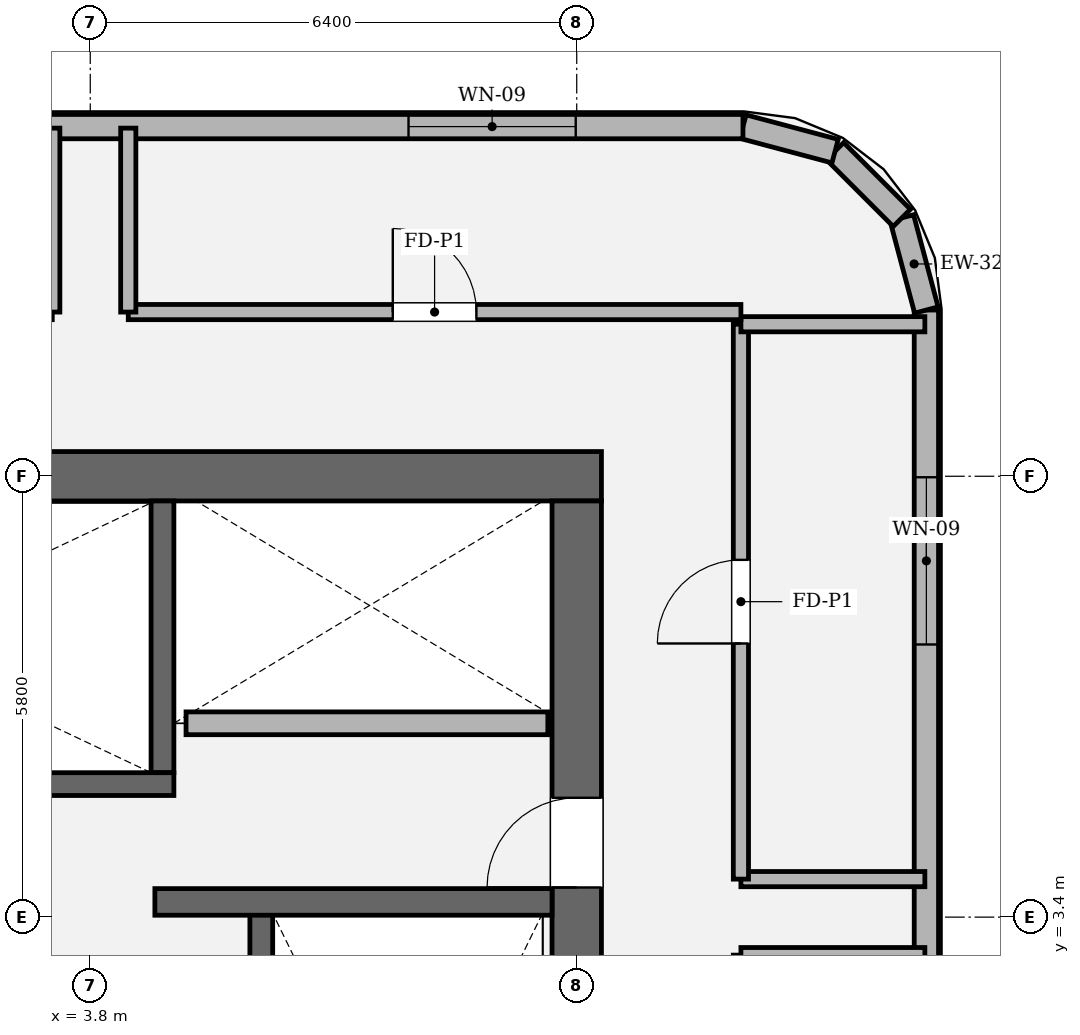
"""IFC4 building model, lengths in metres.
Left out: names, types, materials, properties, quantities, classifications, styles, units other than length and angle.
Written with IfcOpenShell. Run it as: python <this file> out.ifc"""

import sys

from ifc_helpers import new_model, si_unit, direction, frame, frame_2d, origin, place, context, subcontext, project, spatial, rectangle, extrude, element, fill, save


model = new_model("IFC4")
c1 = context("Model", 3, precision=1e-05, world=origin(), true_north=direction((0.0, 1.0)))
c2 = subcontext(c1, "Body", "Model", "MODEL_VIEW")
j1 = project(units=[si_unit("LENGTHUNIT", "METRE"), si_unit("PLANEANGLEUNIT", "RADIAN")], contexts=[c1])
p1 = place(None, origin())
s1 = spatial("IfcSite", under=j1, at=p1, CompositionType="ELEMENT")
p2 = place(p1, origin())
s2 = spatial("IfcBuilding", under=s1, at=p2, CompositionType="ELEMENT")
p3 = place(p2, frame((0.0, 0.0, 130.2)))
s3 = spatial("IfcBuildingStorey", under=s2, at=p3, CompositionType="ELEMENT", Elevation=130.2)
p4 = place(p3, frame((-10.525, 9.2, 0.0), z_axis=(0.0, 0.0, 1.0), x_axis=(1.0, 0.0, 0.0)))
e1 = element("IfcWall", 1, at=p4, inside=s3, PredefinedType="SHEAR", context=c2, shape_type="SweptSolid", body=[
    extrude(rectangle(XDim=21.05, YDim=0.65, at=frame_2d((10.525, 0.0))), origin(), (0.0, 0.0, 1.0), 4.8),
])
p5 = place(p3, frame((10.2, 8.875, 0.0), z_axis=(0.0, 0.0, 1.0), x_axis=(0.0, -1.0, 0.0)))
e2 = element("IfcWall", 2, at=p5, inside=s3, PredefinedType="SHEAR", context=c2, shape_type="SweptSolid", body=[
    extrude(rectangle(XDim=17.75, YDim=0.65, at=frame_2d((8.875, 0.0))), origin(), (0.0, 0.0, 1.0), 4.8),
])
p6 = place(p5, frame((3.905, 0.0, 0.0)))
e3 = element("IfcOpeningElement", 3, at=p6, cuts=e2, PredefinedType="OPENING", context=c2, shape_type="SweptSolid", body=[
    extrude(rectangle(XDim=1.18, YDim=2.2, at=frame_2d((0.59, 1.1))), frame((0.0, 0.335, 0.0), z_axis=(0.0, -1.0, 0.0), x_axis=(1.0, 0.0, 0.0)), (0.0, 0.0, 1.0), 0.67),
])
p7 = place(p3, frame((6.05, 3.45, 0.0), z_axis=(0.0, 0.0, 1.0), x_axis=(0.0, -1.0, 0.0)))
e4 = element("IfcWall", 4, at=p7, inside=s3, PredefinedType="SOLIDWALL", context=c2, shape_type="SweptSolid", body=[
    extrude(rectangle(XDim=8.95, YDim=0.3, at=frame_2d((4.475, 0.0))), origin(), (0.0, 0.0, 1.0), 4.8),
])
p8 = place(p3, frame((4.75, 8.875, 0.0), z_axis=(0.0, 0.0, 1.0), x_axis=(0.0, -1.0, 0.0)))
e5 = element("IfcWall", 5, at=p8, inside=s3, PredefinedType="SOLIDWALL", context=c2, shape_type="SweptSolid", body=[
    extrude(rectangle(XDim=3.575, YDim=0.3, at=frame_2d((1.788, 0.0))), origin(), (0.0, 0.0, 1.0), 4.8),
])
p9 = place(p3, frame((-4.9, 5.15, 0.0), z_axis=(0.0, 0.0, 1.0), x_axis=(1.0, 0.0, 0.0)))
e6 = element("IfcWall", 6, at=p9, inside=s3, PredefinedType="SOLIDWALL", context=c2, shape_type="SweptSolid", body=[
    extrude(rectangle(XDim=9.8, YDim=0.3, at=frame_2d((4.9, 0.0))), origin(), (0.0, 0.0, 1.0), 4.8),
])
p10 = place(p9, frame((0.56, 0.0, 0.0)))
e7 = element("IfcOpeningElement", 7, at=p10, cuts=e6, PredefinedType="OPENING", context=c2, shape_type="SweptSolid", body=[
    extrude(rectangle(XDim=1.18, YDim=2.2, at=frame_2d((0.59, 1.1))), frame((0.0, 0.16, 0.0), z_axis=(0.0, -1.0, 0.0), x_axis=(1.0, 0.0, 0.0)), (0.0, 0.0, 1.0), 0.32),
])
p11 = place(p3, frame((4.65, 3.6, 0.0), z_axis=(0.0, 0.0, 1.0), x_axis=(1.0, 0.0, 0.0)))
e8 = element("IfcWall", 8, at=p11, inside=s3, PredefinedType="SOLIDWALL", context=c2, shape_type="SweptSolid", body=[
    extrude(rectangle(XDim=5.225, YDim=0.35, at=frame_2d((2.613, 0.0))), origin(), (0.0, 0.0, 1.0), 4.8),
])
p12 = place(p3, frame((14.8, -11.387, 0.0), z_axis=(0.0, 0.0, 1.0), x_axis=(0.0, 1.0, 0.0)))
e9 = element("IfcWall", 9, at=p12, inside=s3, PredefinedType="SOLIDWALL", context=c2, shape_type="SweptSolid", body=[
    extrude(rectangle(XDim=22.774, YDim=0.32, at=frame_2d((11.387, 0.0))), origin(), (0.0, 0.0, 1.0), 3.834),
])
p13 = place(p12, frame((2.2, 0.0, 0.9)))
e10 = element("IfcOpeningElement", 10, at=p13, cuts=e9, PredefinedType="OPENING", context=c2, shape_type="SweptSolid", body=[
    extrude(rectangle(XDim=2.2, YDim=1.2, at=frame_2d((1.1, 0.6))), frame((0.0, 0.17, 0.0), z_axis=(0.0, -1.0, 0.0), x_axis=(1.0, 0.0, 0.0)), (0.0, 0.0, 1.0), 0.34),
])
p14 = place(p12, frame((18.374, 0.0, 0.9)))
e11 = element("IfcOpeningElement", 11, at=p14, cuts=e9, PredefinedType="OPENING", context=c2, shape_type="SweptSolid", body=[
    extrude(rectangle(XDim=2.2, YDim=1.2, at=frame_2d((1.1, 0.6))), frame((0.0, 0.17, 0.0), z_axis=(0.0, -1.0, 0.0), x_axis=(1.0, 0.0, 0.0)), (0.0, 0.0, 1.0), 0.34),
])
p15 = place(p3, frame((14.8, 11.387, 0.0), z_axis=(0.0, 0.0, 1.0), x_axis=(-0.25748094776, 0.966283375382, 0.0)))
e12 = element("IfcWall", 12, at=p15, inside=s3, PredefinedType="SOLIDWALL", context=c2, shape_type="SweptSolid", body=[
    extrude(rectangle(XDim=1.254, YDim=0.32, at=frame_2d((0.627, 0.0))), origin(), (0.0, 0.0, 1.0), 3.984),
])
p16 = place(p3, frame((14.477, 12.599, 0.0), z_axis=(0.0, 0.0, 1.0), x_axis=(-0.707106781187, 0.707106781187, 0.0)))
e13 = element("IfcWall", 13, at=p16, inside=s3, PredefinedType="SOLIDWALL", context=c2, shape_type="SweptSolid", body=[
    extrude(rectangle(XDim=1.242, YDim=0.32, at=frame_2d((0.621, 0.0))), origin(), (0.0, 0.0, 1.0), 3.984),
])
p17 = place(p3, frame((13.599, 13.477, 0.0), z_axis=(0.0, 0.0, 1.0), x_axis=(-0.966283375382, 0.25748094776, 0.0)))
e14 = element("IfcWall", 14, at=p17, inside=s3, PredefinedType="SOLIDWALL", context=c2, shape_type="SweptSolid", body=[
    extrude(rectangle(XDim=1.254, YDim=0.32, at=frame_2d((0.627, 0.0))), origin(), (0.0, 0.0, 1.0), 3.984),
])
p18 = place(p3, frame((12.387, 13.8, 0.0), z_axis=(0.0, 0.0, 1.0), x_axis=(-1.0, 0.0, 0.0)))
e15 = element("IfcWall", 15, at=p18, inside=s3, PredefinedType="SOLIDWALL", context=c2, shape_type="SweptSolid", body=[
    extrude(rectangle(XDim=24.774, YDim=0.32, at=frame_2d((12.387, 0.0))), origin(), (0.0, 0.0, 1.0), 3.834),
])
p19 = place(p18, frame((2.2, 0.0, 0.9)))
e16 = element("IfcOpeningElement", 16, at=p19, cuts=e15, PredefinedType="OPENING", context=c2, shape_type="SweptSolid", body=[
    extrude(rectangle(XDim=2.2, YDim=1.2, at=frame_2d((1.1, 0.6))), frame((0.0, 0.17, 0.0), z_axis=(0.0, -1.0, 0.0), x_axis=(1.0, 0.0, 0.0)), (0.0, 0.0, 1.0), 0.34),
])
p20 = place(p18, frame((20.374, 0.0, 0.9)))
e17 = element("IfcOpeningElement", 17, at=p20, cuts=e15, PredefinedType="OPENING", context=c2, shape_type="SweptSolid", body=[
    extrude(rectangle(XDim=2.2, YDim=1.2, at=frame_2d((1.1, 0.6))), frame((0.0, 0.17, 0.0), z_axis=(0.0, -1.0, 0.0), x_axis=(1.0, 0.0, 0.0)), (0.0, 0.0, 1.0), 0.34),
])
p21 = place(p3, frame((5.06, 5.95, 0.0), z_axis=(0.0, 0.0, 1.0), x_axis=(1.0, 0.0, 0.0)))
e18 = element("IfcWall", 18, at=p21, inside=s3, PredefinedType="SOLIDWALL", context=c2, shape_type="SweptSolid", body=[
    extrude(rectangle(XDim=4.76, YDim=0.3, at=frame_2d((2.38, 0.0))), origin(), (0.0, 0.0, 1.0), 4.54),
])
for number, where, z_axis, x_axis in (
    (19, (12.36, 2.9, 0.0), (0.0, 0.0, 1.0), (1.0, 0.0, 0.0)),
    (20, (14.78, 3.9, 0.0), (0.0, 0.0, 1.0), (-1.0, 0.0, 0.0)),
):
    element("IfcWall", number, at=place(p3, frame(where, z_axis=z_axis, x_axis=x_axis)), inside=s3, PredefinedType="SOLIDWALL", context=c2, shape_type="SweptSolid", body=[
        extrude(rectangle(XDim=2.42, YDim=0.2, at=frame_2d((1.21, 0.0))), origin(), (0.0, 0.0, 1.0), 3.984),
    ])
p22 = place(p3, frame((12.36, 3.9, 0.0), z_axis=(0.0, 0.0, 1.0), x_axis=(0.0, 1.0, 0.0)))
e21 = element("IfcWall", 21, at=p22, inside=s3, PredefinedType="SOLIDWALL", context=c2, shape_type="SweptSolid", body=[
    extrude(rectangle(XDim=7.3, YDim=0.2, at=frame_2d((3.65, 0.0))), origin(), (0.0, 0.0, 1.0), 4.54),
])
p23 = place(p22, frame((3.1, 0.0, 0.0)))
e22 = element("IfcOpeningElement", 22, at=p23, cuts=e21, PredefinedType="OPENING", context=c2, shape_type="SweptSolid", body=[
    extrude(rectangle(XDim=1.1, YDim=2.2, at=frame_2d((0.55, 1.1))), frame((0.0, 0.11, 0.0), z_axis=(0.0, -1.0, 0.0), x_axis=(1.0, 0.0, 0.0)), (0.0, 0.0, 1.0), 0.22),
])
for number, where, z_axis, x_axis in (
    (23, (12.36, 11.2, 0.0), (0.0, 0.0, 1.0), (1.0, 0.0, 0.0)),
    (24, (3.3, 13.78, 0.0), (0.0, 0.0, 1.0), (0.0, -1.0, 0.0)),
):
    element("IfcWall", number, at=place(p3, frame(where, z_axis=z_axis, x_axis=x_axis)), inside=s3, PredefinedType="SOLIDWALL", context=c2, shape_type="SweptSolid", body=[
        extrude(rectangle(XDim=2.42, YDim=0.2, at=frame_2d((1.21, 0.0))), origin(), (0.0, 0.0, 1.0), 3.984),
    ])
p24 = place(p3, frame((12.36, 11.36, 0.0), z_axis=(0.0, 0.0, 1.0), x_axis=(-1.0, 0.0, 0.0)))
e25 = element("IfcWall", 25, at=p24, inside=s3, PredefinedType="SOLIDWALL", context=c2, shape_type="SweptSolid", body=[
    extrude(rectangle(XDim=8.06, YDim=0.2, at=frame_2d((4.03, 0.0))), origin(), (0.0, 0.0, 1.0), 4.54),
])
p25 = place(p24, frame((3.48, 0.0, 0.0)))
e26 = element("IfcOpeningElement", 26, at=p25, cuts=e25, PredefinedType="OPENING", context=c2, shape_type="SweptSolid", body=[
    extrude(rectangle(XDim=1.1, YDim=2.2, at=frame_2d((0.55, 1.1))), frame((0.0, 0.11, 0.0), z_axis=(0.0, -1.0, 0.0), x_axis=(1.0, 0.0, 0.0)), (0.0, 0.0, 1.0), 0.22),
])
p26 = place(p3, frame((4.3, 11.36, 0.0), z_axis=(0.0, 0.0, 1.0), x_axis=(0.0, 1.0, 0.0)))
e27 = element("IfcWall", 27, at=p26, inside=s3, PredefinedType="SOLIDWALL", context=c2, shape_type="SweptSolid", body=[
    extrude(rectangle(XDim=2.42, YDim=0.2, at=frame_2d((1.21, 0.0))), origin(), (0.0, 0.0, 1.0), 3.984),
])
p27 = place(p14, origin())
e28 = element("IfcWindow", 28, at=p27, inside=s3, PartitioningType="SINGLE_PANEL", PredefinedType="WINDOW", context=c2, shape_type="SweptSolid", body=[
    extrude(rectangle(XDim=2.2, YDim=1.2, at=frame_2d((1.1, 0.6))), frame((0.0, 0.03, 0.0), z_axis=(0.0, -1.0, 0.0), x_axis=(1.0, 0.0, 0.0)), (0.0, 0.0, 1.0), 0.06),
])
fill(e11, e28)
p28 = place(p19, origin())
e29 = element("IfcWindow", 29, at=p28, inside=s3, PartitioningType="SINGLE_PANEL", PredefinedType="WINDOW", context=c2, shape_type="SweptSolid", body=[
    extrude(rectangle(XDim=2.2, YDim=1.2, at=frame_2d((1.1, 0.6))), frame((0.0, 0.03, 0.0), z_axis=(0.0, -1.0, 0.0), x_axis=(1.0, 0.0, 0.0)), (0.0, 0.0, 1.0), 0.06),
])
fill(e16, e29)
p29 = place(p6, origin())
e30 = element("IfcDoor", 30, at=p29, inside=s3, OperationType="SINGLE_SWING_RIGHT", PredefinedType="DOOR", context=c2, shape_type="SweptSolid", body=[
    extrude(rectangle(XDim=1.18, YDim=2.2, at=frame_2d((0.59, 1.1))), frame((0.0, 0.025, 0.0), z_axis=(0.0, -1.0, 0.0), x_axis=(1.0, 0.0, 0.0)), (0.0, 0.0, 1.0), 0.05),
])
fill(e3, e30)
p30 = place(p23, origin())
e31 = element("IfcDoor", 31, at=p30, inside=s3, OperationType="SINGLE_SWING_LEFT", PredefinedType="DOOR", context=c2, shape_type="SweptSolid", body=[
    extrude(rectangle(XDim=1.1, YDim=2.2, at=frame_2d((0.55, 1.1))), frame((0.0, 0.025, 0.0), z_axis=(0.0, -1.0, 0.0), x_axis=(1.0, 0.0, 0.0)), (0.0, 0.0, 1.0), 0.05),
])
fill(e22, e31)
p31 = place(p25, origin())
e32 = element("IfcDoor", 32, at=p31, inside=s3, OperationType="SINGLE_SWING_RIGHT", PredefinedType="DOOR", context=c2, shape_type="SweptSolid", body=[
    extrude(rectangle(XDim=1.1, YDim=2.2, at=frame_2d((0.55, 1.1))), frame((0.0, 0.025, 0.0), z_axis=(0.0, -1.0, 0.0), x_axis=(1.0, 0.0, 0.0)), (0.0, 0.0, 1.0), 0.05),
])
fill(e26, e32)
save(model, sys.argv[1])
